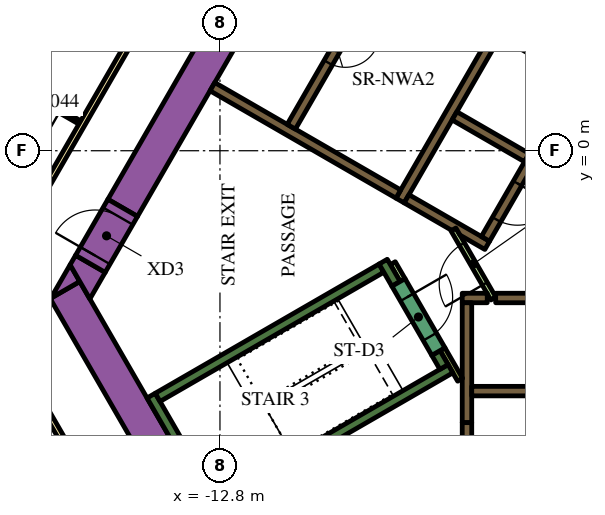
"""IFC4 building model, lengths in metres.
Left out: names, types, materials, properties, quantities, classifications, styles, units other than length and angle.
Written with IfcOpenShell. Run it as: python <this file> out.ifc"""

import sys

from ifc_helpers import new_model, si_unit, direction, frame, frame_2d, origin, place, context, subcontext, project, spatial, polyline, rectangle, outline, extrude, element, fill, save


model = new_model("IFC4")
c1 = context("Model", 3, precision=1e-05, world=origin(), true_north=direction((0.0, 1.0)))
c2 = subcontext(c1, "Body", "Model", "MODEL_VIEW")
j1 = project(units=[si_unit("LENGTHUNIT", "METRE"), si_unit("PLANEANGLEUNIT", "RADIAN")], contexts=[c1])
p1 = place(None, origin())
s1 = spatial("IfcSite", under=j1, at=p1, CompositionType="ELEMENT")
p2 = place(p1, origin())
s2 = spatial("IfcBuilding", under=s1, at=p2, CompositionType="ELEMENT")
p3 = place(p2, frame((0.0, 0.0, 103.2)))
s3 = spatial("IfcBuildingStorey", under=s2, at=p3, CompositionType="ELEMENT", Elevation=103.2)
p4 = place(p3, frame((-15.36, -1.503, 0.0), z_axis=(0.0, 0.0, 1.0), x_axis=(0.50000389221, 0.866023156604, 0.0)))
e1 = element("IfcWall", 1, at=p4, inside=s3, PredefinedType="SOLIDWALL", context=c2, shape_type="SweptSolid", body=[
    extrude(rectangle(XDim=21.0, YDim=0.9, at=frame_2d((10.5, 0.0))), origin(), (0.0, 0.0, 1.0), 3.9),
])
p5 = place(p3, frame((-12.134, -11.883, 0.0), z_axis=(0.0, 0.0, 1.0), x_axis=(-0.500005339912, 0.866022320763, 0.0)))
e2 = element("IfcWall", 2, at=p5, inside=s3, PredefinedType="SOLIDWALL", context=c2, shape_type="SweptSolid", body=[
    extrude(rectangle(XDim=9.488, YDim=0.9, at=frame_2d((4.744, 0.0))), origin(), (0.0, 0.0, 1.0), 3.9),
])
p6 = place(p3, origin())
e3 = element("IfcWall", 3, at=p6, inside=s3, PredefinedType="SOLIDWALL", context=c2, shape_type="SweptSolid", body=[
    extrude(outline(polyline([(-16.489, -3.44), (-17.251, -3.88), (-16.743, -3.0), (-16.489, -3.44)])), origin(), (0.0, 0.0, 1.0), 3.9),
])
e4 = element("IfcWall", 4, at=p6, inside=s3, PredefinedType="SOLIDWALL", context=c2, shape_type="SweptSolid", body=[
    extrude(outline(polyline([(-15.82, -3.201), (-16.223, -3.9), (-16.743, -3.0), (-16.599, -2.751), (-15.82, -3.201)])), origin(), (0.0, 0.0, 1.0), 3.9),
])
p7 = place(p3, frame((-12.885, -9.431, 0.0), z_axis=(0.0, 0.0, 1.0), x_axis=(-0.500020560727, 0.866013532718, 0.0)))
e5 = element("IfcWall", 5, at=p7, inside=s3, PredefinedType="SOLIDWALL", context=c2, shape_type="SweptSolid", body=[
    extrude(rectangle(XDim=3.45, YDim=0.25, at=frame_2d((1.725, 0.0))), origin(), (0.0, 0.0, 1.0), 3.9),
])
p8 = place(p3, frame((-14.44, -6.49, 0.0), z_axis=(0.0, 0.0, 1.0), x_axis=(0.866022966069, 0.500004222222, 0.0)))
e6 = element("IfcWall", 6, at=p8, inside=s3, PredefinedType="SOLIDWALL", context=c2, shape_type="SweptSolid", body=[
    extrude(rectangle(XDim=6.8, YDim=0.25, at=frame_2d((3.4, 0.0))), origin(), (0.0, 0.0, 1.0), 3.9),
])
p9 = place(p3, frame((-8.168, -3.503, 0.0), z_axis=(0.0, 0.0, 1.0), x_axis=(-0.499952099219, 0.866053057547, 0.0)))
e7 = element("IfcWall", 7, at=p9, inside=s3, PredefinedType="SOLIDWALL", context=c2, shape_type="SweptSolid", body=[
    extrude(rectangle(XDim=0.675, YDim=0.25, at=frame_2d((0.337, 0.0))), origin(), (0.0, 0.0, 1.0), 3.9),
])
p10 = place(p3, frame((-12.84, -9.261, 0.0), z_axis=(0.0, 0.0, 1.0), x_axis=(0.866016039709, 0.500016218704, 0.0)))
e8 = element("IfcWall", 8, at=p10, inside=s3, PredefinedType="SOLIDWALL", context=c2, shape_type="SweptSolid", body=[
    extrude(rectangle(XDim=7.05, YDim=0.25, at=frame_2d((3.525, 0.0))), origin(), (0.0, 0.0, 1.0), 3.9),
])
p11 = place(p3, frame((-6.905, -5.69, 0.0), z_axis=(0.0, 0.0, 1.0), x_axis=(-0.500402024738, 0.865793170242, 0.0)))
e9 = element("IfcWall", 9, at=p11, inside=s3, PredefinedType="SOLIDWALL", context=c2, shape_type="SweptSolid", body=[
    extrude(rectangle(XDim=0.425, YDim=0.25, at=frame_2d((0.212, 0.0))), origin(), (0.0, 0.0, 1.0), 3.9),
])
p12 = place(p3, frame((-5.545, -3.875, 0.0), z_axis=(0.0, 0.0, 1.0), x_axis=(1.0, 0.0, 0.0)))
e10 = element("IfcWall", 10, at=p12, inside=s3, PredefinedType="SOLIDWALL", context=c2, shape_type="SweptSolid", body=[
    extrude(rectangle(XDim=11.97, YDim=0.25, at=frame_2d((5.985, 0.0))), origin(), (0.0, 0.0, 1.0), 3.9),
])
p13 = place(p3, frame((-6.425, -3.875, 0.0), z_axis=(0.0, 0.0, 1.0), x_axis=(1.0, 0.0, 0.0)))
e11 = element("IfcWall", 11, at=p13, inside=s3, PredefinedType="SOLIDWALL", context=c2, shape_type="SweptSolid", body=[
    extrude(rectangle(XDim=0.658, YDim=0.25, at=frame_2d((0.329, 0.0))), origin(), (0.0, 0.0, 1.0), 3.9),
])
p14 = place(p3, frame((-6.3, -4.0, 0.0), z_axis=(0.0, 0.0, 1.0), x_axis=(0.0, -1.0, 0.0)))
e12 = element("IfcWall", 12, at=p14, inside=s3, PredefinedType="SOLIDWALL", context=c2, shape_type="SweptSolid", body=[
    extrude(rectangle(XDim=3.154, YDim=0.25, at=frame_2d((1.577, 0.0))), origin(), (0.0, 0.0, 1.0), 3.9),
])
p15 = place(p3, frame((-8.06, -1.311, 0.0), z_axis=(0.0, 0.0, 1.0), x_axis=(0.50000273126, 0.866023826885, 0.0)))
e13 = element("IfcWall", 13, at=p15, inside=s3, PredefinedType="SOLIDWALL", context=c2, shape_type="SweptSolid", body=[
    extrude(rectangle(XDim=10.33, YDim=0.25, at=frame_2d((5.165, 0.0))), origin(), (0.0, 0.0, 1.0), 3.9),
])
for number, where, z_axis, x_axis in (
    (14, (-5.369, 3.1, 0.0), (0.0, 0.0, 1.0), (0.866, -0.5, 0.0)),
    (15, (-4.724, -0.182, 0.0), (0.0, 0.0, 1.0), (-0.866, 0.5, 0.0)),
):
    element("IfcWall", number, at=place(p3, frame(where, z_axis=z_axis, x_axis=x_axis)), inside=s3, PredefinedType="SOLIDWALL", context=c2, shape_type="SweptSolid", body=[
        extrude(rectangle(XDim=2.2, YDim=0.25, at=frame_2d((1.1, 0.0))), origin(), (0.0, 0.0, 1.0), 3.9),
    ])
e16 = element("IfcWall", 16, at=p6, inside=s3, PredefinedType="SOLIDWALL", context=c2, shape_type="SweptSolid", body=[
    extrude(outline(polyline([(-5.922, -2.257), (-5.922, -2.257), (-5.705, -2.382), (-5.83, -2.598), (-6.483, -2.221), (-6.591, -2.033), (-6.591, -2.033), (-6.7, -2.096), (-7.952, -1.373), (-7.827, -1.156), (-5.922, -2.257)])), origin(), (0.0, 0.0, 1.0), 3.9),
])
p16 = place(p3, frame((-8.106, -1.14, 0.0), z_axis=(0.0, 0.0, 1.0), x_axis=(-0.866000643155, 0.500042884217, 0.0)))
e17 = element("IfcWall", 17, at=p16, inside=s3, PredefinedType="SOLIDWALL", context=c2, shape_type="SweptSolid", body=[
    extrude(rectangle(XDim=5.65, YDim=0.25, at=frame_2d((2.825, 0.0))), origin(), (0.0, 0.0, 1.0), 3.9),
])
p17 = place(p3, frame((-6.48, -6.027, 0.0), z_axis=(0.0, 0.0, 1.0), x_axis=(-0.499927229454, 0.866067413802, 0.0)))
e18 = element("IfcWall", 18, at=p17, inside=s3, PredefinedType="PARTITIONING", context=c2, shape_type="SweptSolid", body=[
    extrude(rectangle(XDim=0.929, YDim=0.15, at=frame_2d((0.464, 0.0))), origin(), (0.0, 0.0, 1.0), 3.9),
])
p18 = place(p3, frame((-8.252, -2.958, 0.0), z_axis=(0.0, 0.0, 1.0), x_axis=(0.500174715838, -0.865924508047, 0.0)))
e19 = element("IfcWall", 19, at=p18, inside=s3, PredefinedType="PARTITIONING", context=c2, shape_type="SweptSolid", body=[
    extrude(rectangle(XDim=0.514, YDim=0.15, at=frame_2d((0.257, 0.0))), origin(), (0.0, 0.0, 1.0), 2.75),
])
p19 = place(p3, frame((-6.175, -6.325, 0.0), z_axis=(0.0, 0.0, 1.0), x_axis=(1.0, 0.0, 0.0)))
e20 = element("IfcWall", 20, at=p19, inside=s3, PredefinedType="SOLIDWALL", context=c2, shape_type="SweptSolid", body=[
    extrude(rectangle(XDim=12.35, YDim=0.25, at=frame_2d((6.175, 0.0))), origin(), (0.0, 0.0, 1.0), 3.9),
])
p20 = place(p19, frame((3.205, 0.0, 0.0)))
e21 = element("IfcOpeningElement", 21, at=p20, cuts=e20, PredefinedType="OPENING", context=c2, shape_type="SweptSolid", body=[
    extrude(rectangle(XDim=0.9, YDim=2.1, at=frame_2d((0.45, 1.05))), frame((0.0, 0.135, 0.0), z_axis=(0.0, -1.0, 0.0), x_axis=(1.0, 0.0, 0.0)), (0.0, 0.0, 1.0), 0.27),
])
p21 = place(p19, frame((8.145, 0.0, 0.0)))
e22 = element("IfcOpeningElement", 22, at=p21, cuts=e20, PredefinedType="OPENING", context=c2, shape_type="SweptSolid", body=[
    extrude(rectangle(XDim=1.1, YDim=2.1, at=frame_2d((0.55, 1.05))), frame((0.0, 0.135, 0.0), z_axis=(0.0, -1.0, 0.0), x_axis=(1.0, 0.0, 0.0)), (0.0, 0.0, 1.0), 0.27),
])
p22 = place(p19, frame((10.665, 0.0, 0.0)))
e23 = element("IfcOpeningElement", 23, at=p22, cuts=e20, PredefinedType="OPENING", context=c2, shape_type="SweptSolid", body=[
    extrude(rectangle(XDim=1.1, YDim=2.1, at=frame_2d((0.55, 1.05))), frame((0.0, 0.135, 0.0), z_axis=(0.0, -1.0, 0.0), x_axis=(1.0, 0.0, 0.0)), (0.0, 0.0, 1.0), 0.27),
])
p23 = place(p3, frame((-6.008, 9.144, 0.0), z_axis=(0.0, 0.0, 1.0), x_axis=(-0.500006956611, -0.866021387346, 0.0)))
e24 = element("IfcWall", 24, at=p23, inside=s3, PredefinedType="SOLIDWALL", context=c2, shape_type="SweptSolid", body=[
    extrude(rectangle(XDim=9.83, YDim=0.25, at=frame_2d((4.915, 0.0))), origin(), (0.0, 0.0, 1.0), 3.9),
])
p24 = place(p23, frame((6.985, 0.0, 0.0)))
e25 = element("IfcOpeningElement", 25, at=p24, cuts=e24, PredefinedType="OPENING", context=c2, shape_type="SweptSolid", body=[
    extrude(rectangle(XDim=0.9, YDim=2.1, at=frame_2d((0.45, 1.05))), frame((0.0, 0.135, 0.0), z_axis=(0.0, -1.0, 0.0), x_axis=(1.0, 0.0, 0.0)), (0.0, 0.0, 1.0), 0.27),
])
p25 = place(p3, frame((-0.898, 6.194, 0.0), z_axis=(0.0, 0.0, 1.0), x_axis=(-0.499996202215, -0.866027596426, 0.0)))
e26 = element("IfcWall", 26, at=p25, inside=s3, PredefinedType="SOLIDWALL", context=c2, shape_type="SweptSolid", body=[
    extrude(rectangle(XDim=9.83, YDim=0.25, at=frame_2d((4.915, 0.0))), origin(), (0.0, 0.0, 1.0), 3.9),
])
p26 = place(p25, frame((0.585, 0.0, 0.0)))
e27 = element("IfcOpeningElement", 27, at=p26, cuts=e26, PredefinedType="OPENING", context=c2, shape_type="SweptSolid", body=[
    extrude(rectangle(XDim=1.1, YDim=2.1, at=frame_2d((0.55, 1.05))), frame((0.0, 0.135, 0.0), z_axis=(0.0, -1.0, 0.0), x_axis=(1.0, 0.0, 0.0)), (0.0, 0.0, 1.0), 0.27),
])
p27 = place(p25, frame((3.105, 0.0, 0.0)))
e28 = element("IfcOpeningElement", 28, at=p27, cuts=e26, PredefinedType="OPENING", context=c2, shape_type="SweptSolid", body=[
    extrude(rectangle(XDim=1.1, YDim=2.1, at=frame_2d((0.55, 1.05))), frame((0.0, 0.135, 0.0), z_axis=(0.0, -1.0, 0.0), x_axis=(1.0, 0.0, 0.0)), (0.0, 0.0, 1.0), 0.27),
])
p28 = place(p25, frame((5.625, 0.0, 0.0)))
e29 = element("IfcOpeningElement", 29, at=p28, cuts=e26, PredefinedType="OPENING", context=c2, shape_type="SweptSolid", body=[
    extrude(rectangle(XDim=1.1, YDim=2.1, at=frame_2d((0.55, 1.05))), frame((0.0, 0.135, 0.0), z_axis=(0.0, -1.0, 0.0), x_axis=(1.0, 0.0, 0.0)), (0.0, 0.0, 1.0), 0.27),
])
p29 = place(p25, frame((8.145, 0.0, 0.0)))
e30 = element("IfcOpeningElement", 30, at=p29, cuts=e26, PredefinedType="OPENING", context=c2, shape_type="SweptSolid", body=[
    extrude(rectangle(XDim=1.1, YDim=2.1, at=frame_2d((0.55, 1.05))), frame((0.0, 0.135, 0.0), z_axis=(0.0, -1.0, 0.0), x_axis=(1.0, 0.0, 0.0)), (0.0, 0.0, 1.0), 0.27),
])
p30 = place(p3, frame((-8.103, -3.466, 0.0), z_axis=(0.0, 0.0, 1.0), x_axis=(0.500078061341, -0.865980330357, 0.0)))
e31 = element("IfcWall", 31, at=p30, inside=s3, PredefinedType="SOLIDWALL", context=c2, shape_type="SweptSolid", body=[
    extrude(rectangle(XDim=2.1, YDim=0.4, at=frame_2d((1.05, 0.0))), origin(), (0.0, 0.0, 1.0), 3.9),
])
p31 = place(p30, frame((0.45, 0.0, 0.0)))
e32 = element("IfcOpeningElement", 32, at=p31, cuts=e31, PredefinedType="OPENING", context=c2, shape_type="SweptSolid", body=[
    extrude(rectangle(XDim=1.2, YDim=2.1, at=frame_2d((0.6, 1.05))), frame((0.0, 0.21, 0.0), z_axis=(0.0, -1.0, 0.0), x_axis=(1.0, 0.0, 0.0)), (0.0, 0.0, 1.0), 0.42),
])
p32 = place(p3, frame((-6.3, -7.154, 0.0), z_axis=(0.0, 0.0, 1.0), x_axis=(0.0, -1.0, 0.0)))
e33 = element("IfcWall", 33, at=p32, inside=s3, PredefinedType="SOLIDWALL", context=c2, shape_type="SweptSolid", body=[
    extrude(rectangle(XDim=1.8, YDim=0.25, at=frame_2d((0.9, 0.0))), origin(), (0.0, 0.0, 1.0), 3.9),
])
p33 = place(p32, frame((0.45, 0.0, 0.0)))
e34 = element("IfcOpeningElement", 34, at=p33, cuts=e33, PredefinedType="OPENING", context=c2, shape_type="SweptSolid", body=[
    extrude(rectangle(XDim=0.9, YDim=2.1, at=frame_2d((0.45, 1.05))), frame((0.0, 0.135, 0.0), z_axis=(0.0, -1.0, 0.0), x_axis=(1.0, 0.0, 0.0)), (0.0, 0.0, 1.0), 0.27),
])
p34 = place(p3, frame((-5.606, -3.89, 0.0), z_axis=(0.0, 0.0, 1.0), x_axis=(-0.500027713859, 0.866009402589, 0.0)))
e35 = element("IfcWall", 35, at=p34, inside=s3, PredefinedType="PARTITIONING", context=c2, shape_type="SweptSolid", body=[
    extrude(rectangle(XDim=2.1, YDim=0.15, at=frame_2d((1.05, 0.0))), origin(), (0.0, 0.0, 1.0), 2.75),
])
p35 = place(p34, frame((0.45, 0.0, 0.0)))
e36 = element("IfcOpeningElement", 36, at=p35, cuts=e35, PredefinedType="OPENING", context=c2, shape_type="SweptSolid", body=[
    extrude(rectangle(XDim=1.2, YDim=2.1, at=frame_2d((0.6, 1.05))), frame((0.0, 0.085, 0.0), z_axis=(0.0, -1.0, 0.0), x_axis=(1.0, 0.0, 0.0)), (0.0, 0.0, 1.0), 0.17),
])
p36 = place(p3, frame((-16.209, -2.976, 0.0), z_axis=(0.0, 0.0, 1.0), x_axis=(0.499954529098, 0.86605165483, 0.0)))
e37 = element("IfcWall", 37, at=p36, inside=s3, PredefinedType="SOLIDWALL", context=c2, shape_type="SweptSolid", body=[
    extrude(rectangle(XDim=1.7, YDim=0.9, at=frame_2d((0.85, 0.0))), origin(), (0.0, 0.0, 1.0), 3.9),
])
p37 = place(p36, frame((0.25, 0.0, 0.0)))
e38 = element("IfcOpeningElement", 38, at=p37, cuts=e37, PredefinedType="OPENING", context=c2, shape_type="SweptSolid", body=[
    extrude(rectangle(XDim=1.2, YDim=2.1, at=frame_2d((0.6, 1.05))), frame((0.0, 0.46, 0.0), z_axis=(0.0, -1.0, 0.0), x_axis=(1.0, 0.0, 0.0)), (0.0, 0.0, 1.0), 0.92),
])
p38 = place(p3, frame((-19.081, -3.9, 0.0), z_axis=(0.0, 0.0, 1.0), x_axis=(0.499998313975, 0.866026377209, 0.0)))
e39 = element("IfcWall", 39, at=p38, inside=s3, PredefinedType="PARTITIONING", context=c2, shape_type="SweptSolid", body=[
    extrude(rectangle(XDim=25.766, YDim=0.15, at=frame_2d((12.883, 0.0))), origin(), (0.0, 0.0, 1.0), 2.75),
])
p39 = place(p38, frame((19.306, 0.0, 0.0)))
e40 = element("IfcOpeningElement", 40, at=p39, cuts=e39, PredefinedType="OPENING", context=c2, shape_type="SweptSolid", body=[
    extrude(rectangle(XDim=1.0, YDim=2.1, at=frame_2d((0.5, 1.05))), frame((0.0, 0.085, 0.0), z_axis=(0.0, -1.0, 0.0), x_axis=(1.0, 0.0, 0.0)), (0.0, 0.0, 1.0), 0.17),
])
p40 = place(p38, frame((17.144, 0.0, 0.0)))
e41 = element("IfcOpeningElement", 41, at=p40, cuts=e39, PredefinedType="OPENING", context=c2, shape_type="SweptSolid", body=[
    extrude(rectangle(XDim=0.9, YDim=2.1, at=frame_2d((0.45, 1.05))), frame((0.0, 0.085, 0.0), z_axis=(0.0, -1.0, 0.0), x_axis=(1.0, 0.0, 0.0)), (0.0, 0.0, 1.0), 0.17),
])
p41 = place(p38, frame((9.955, 0.0, 0.0)))
e42 = element("IfcOpeningElement", 42, at=p41, cuts=e39, PredefinedType="OPENING", context=c2, shape_type="SweptSolid", body=[
    extrude(rectangle(XDim=1.1, YDim=2.1, at=frame_2d((0.55, 1.05))), frame((0.0, 0.085, 0.0), z_axis=(0.0, -1.0, 0.0), x_axis=(1.0, 0.0, 0.0)), (0.0, 0.0, 1.0), 0.17),
])
p42 = place(p38, frame((8.648, 0.0, 0.0)))
e43 = element("IfcOpeningElement", 43, at=p42, cuts=e39, PredefinedType="OPENING", context=c2, shape_type="SweptSolid", body=[
    extrude(rectangle(XDim=1.0, YDim=2.1, at=frame_2d((0.5, 1.05))), frame((0.0, 0.085, 0.0), z_axis=(0.0, -1.0, 0.0), x_axis=(1.0, 0.0, 0.0)), (0.0, 0.0, 1.0), 0.17),
])
p43 = place(p38, frame((1.553, 0.0, 0.0)))
e44 = element("IfcOpeningElement", 44, at=p43, cuts=e39, PredefinedType="OPENING", context=c2, shape_type="SweptSolid", body=[
    extrude(rectangle(XDim=0.9, YDim=2.1, at=frame_2d((0.45, 1.05))), frame((0.0, 0.085, 0.0), z_axis=(0.0, -1.0, 0.0), x_axis=(1.0, 0.0, 0.0)), (0.0, 0.0, 1.0), 0.17),
])
p44 = place(p3, frame((-16.412, -8.523, 0.0), z_axis=(0.0, 0.0, 1.0), x_axis=(-0.500001929737, 0.866024289647, 0.0)))
e45 = element("IfcWall", 45, at=p44, inside=s3, PredefinedType="PARTITIONING", context=c2, shape_type="SweptSolid", body=[
    extrude(rectangle(XDim=5.268, YDim=0.15, at=frame_2d((2.634, 0.0))), origin(), (0.0, 0.0, 1.0), 2.75),
])
p45 = place(p44, frame((4.088, 0.0, 0.0)))
e46 = element("IfcOpeningElement", 46, at=p45, cuts=e45, PredefinedType="OPENING", context=c2, shape_type="SweptSolid", body=[
    extrude(rectangle(XDim=1.0, YDim=2.1, at=frame_2d((0.5, 1.05))), frame((0.0, 0.085, 0.0), z_axis=(0.0, -1.0, 0.0), x_axis=(1.0, 0.0, 0.0)), (0.0, 0.0, 1.0), 0.17),
])
p46 = place(p3, frame((-16.487, 0.743, 0.0), z_axis=(0.0, 0.0, 1.0), x_axis=(-0.866021400173, 0.500006934395, 0.0)))
e47 = element("IfcWall", 47, at=p46, inside=s3, PredefinedType="PARTITIONING", context=c2, shape_type="SweptSolid", body=[
    extrude(rectangle(XDim=2.6, YDim=0.1, at=frame_2d((1.3, 0.0))), origin(), (0.0, 0.0, 1.0), 2.75),
])
p47 = place(p46, frame((0.6, 0.0, 0.0)))
e48 = element("IfcOpeningElement", 48, at=p47, cuts=e47, PredefinedType="OPENING", context=c2, shape_type="SweptSolid", body=[
    extrude(rectangle(XDim=0.9, YDim=2.1, at=frame_2d((0.45, 1.05))), frame((0.0, 0.06, 0.0), z_axis=(0.0, -1.0, 0.0), x_axis=(1.0, 0.0, 0.0)), (0.0, 0.0, 1.0), 0.12),
])
p48 = place(p24, origin())
e49 = element("IfcDoor", 49, at=p48, inside=s3, OperationType="SINGLE_SWING_LEFT", PredefinedType="DOOR", context=c2, shape_type="SweptSolid", body=[
    extrude(rectangle(XDim=0.9, YDim=2.1, at=frame_2d((0.45, 1.05))), frame((0.0, 0.025, 0.0), z_axis=(0.0, -1.0, 0.0), x_axis=(1.0, 0.0, 0.0)), (0.0, 0.0, 1.0), 0.05),
])
fill(e25, e49)
p49 = place(p29, origin())
e50 = element("IfcDoor", 50, at=p49, inside=s3, OperationType="DOUBLE_DOOR_SLIDING", PredefinedType="DOOR", context=c2, shape_type="SweptSolid", body=[
    extrude(rectangle(XDim=1.1, YDim=2.1, at=frame_2d((0.55, 1.05))), frame((0.0, 0.025, 0.0), z_axis=(0.0, -1.0, 0.0), x_axis=(1.0, 0.0, 0.0)), (0.0, 0.0, 1.0), 0.05),
])
fill(e30, e50)
p50 = place(p31, origin())
e51 = element("IfcDoor", 51, at=p50, inside=s3, OperationType="SINGLE_SWING_LEFT", PredefinedType="DOOR", context=c2, shape_type="SweptSolid", body=[
    extrude(rectangle(XDim=1.2, YDim=2.1, at=frame_2d((0.6, 1.05))), frame((0.0, 0.025, 0.0), z_axis=(0.0, -1.0, 0.0), x_axis=(1.0, 0.0, 0.0)), (0.0, 0.0, 1.0), 0.05),
])
fill(e32, e51)
p51 = place(p35, origin())
e52 = element("IfcDoor", 52, at=p51, inside=s3, OperationType="SINGLE_SWING_LEFT", PredefinedType="DOOR", context=c2, shape_type="SweptSolid", body=[
    extrude(rectangle(XDim=1.2, YDim=2.1, at=frame_2d((0.6, 1.05))), frame((0.0, 0.025, 0.0), z_axis=(0.0, -1.0, 0.0), x_axis=(1.0, 0.0, 0.0)), (0.0, 0.0, 1.0), 0.05),
])
fill(e36, e52)
p52 = place(p37, origin())
e53 = element("IfcDoor", 53, at=p52, inside=s3, OperationType="SINGLE_SWING_LEFT", PredefinedType="DOOR", context=c2, shape_type="SweptSolid", body=[
    extrude(rectangle(XDim=1.2, YDim=2.1, at=frame_2d((0.6, 1.05))), frame((0.0, 0.025, 0.0), z_axis=(0.0, -1.0, 0.0), x_axis=(1.0, 0.0, 0.0)), (0.0, 0.0, 1.0), 0.05),
])
fill(e38, e53)
p53 = place(p47, origin())
e54 = element("IfcDoor", 54, at=p53, inside=s3, OperationType="SINGLE_SWING_LEFT", PredefinedType="DOOR", context=c2, shape_type="SweptSolid", body=[
    extrude(rectangle(XDim=0.9, YDim=2.1, at=frame_2d((0.45, 1.05))), frame((0.0, 0.025, 0.0), z_axis=(0.0, -1.0, 0.0), x_axis=(1.0, 0.0, 0.0)), (0.0, 0.0, 1.0), 0.05),
])
fill(e48, e54)
save(model, sys.argv[1])
